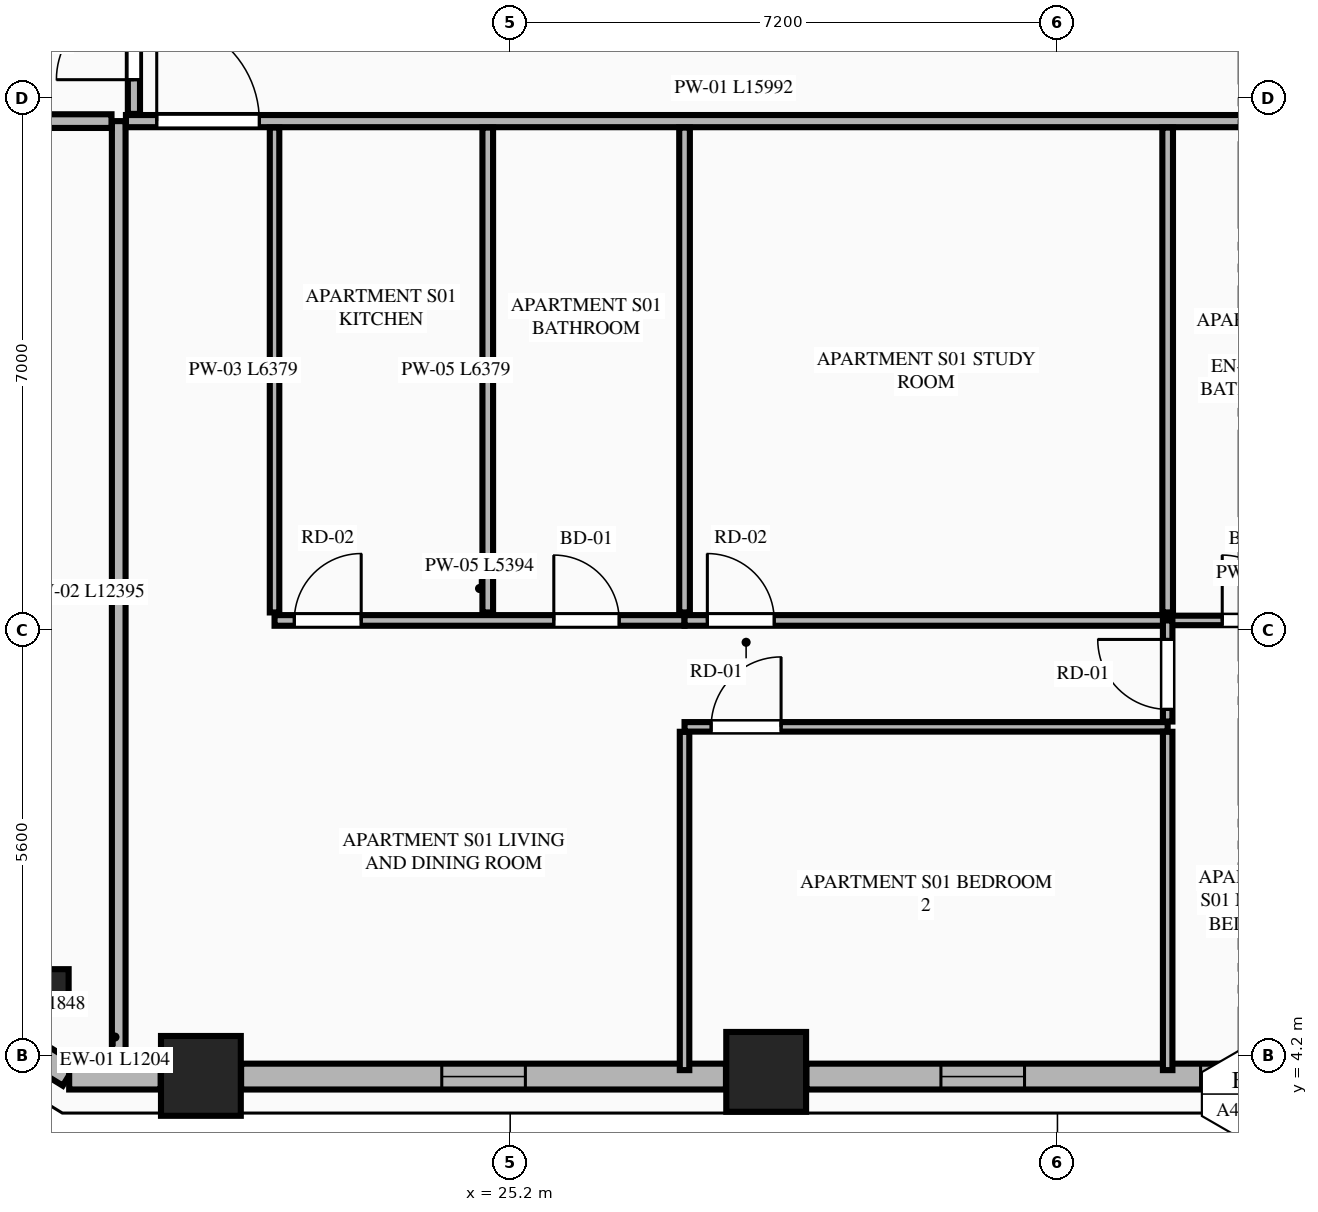
"""IFC4 building model, lengths in metres.
Left out: names, types, materials, properties, quantities, classifications, styles, units other than length and angle.
Written with IfcOpenShell. Run it as: python <this file> out.ifc"""

import sys

from ifc_helpers import new_model, si_unit, direction, frame, frame_2d, origin, origin_2d, place, context, subcontext, project, spatial, rectangle, extrude, element, fill, save


model = new_model("IFC4")
c1 = context("Model", 3, precision=1e-05, world=origin(), true_north=direction((0.0, 1.0)))
c2 = subcontext(c1, "Body", "Model", "MODEL_VIEW")
j1 = project(units=[si_unit("LENGTHUNIT", "METRE"), si_unit("PLANEANGLEUNIT", "RADIAN")], contexts=[c1])
p1 = place(None, origin())
s1 = spatial("IfcSite", under=j1, at=p1, CompositionType="ELEMENT")
p2 = place(p1, origin())
s2 = spatial("IfcBuilding", under=s1, at=p2, CompositionType="ELEMENT")
p3 = place(p2, frame((0.0, 0.0, 101.95)))
s3 = spatial("IfcBuildingStorey", under=s2, at=p3, CompositionType="ELEMENT", Elevation=101.95)
for number, where, z_axis, x_axis in (
    (1, (21.131, 3.939, 0.0), (0.0, 0.0, 1.0), (1.0, 0.0, 0.0)),
    (2, (28.568, 3.992, 0.0), (0.0, 0.0, 1.0), (1.0, 0.0, 0.0)),
):
    element("IfcColumn", number, at=place(p3, frame(where, z_axis=z_axis, x_axis=x_axis)), inside=s3, PredefinedType="COLUMN", context=c2, shape_type="SweptSolid", body=[
        extrude(rectangle(XDim=1.05, YDim=1.05, at=origin_2d()), origin(), (0.0, 0.0, 1.0), 3.55),
    ])
p4 = place(p3, frame((19.141, 5.093, 0.0), z_axis=(0.0, 0.0, 1.0), x_axis=(0.865160173452, -0.501495637342, 0.0)))
e3 = element("IfcColumn", 3, at=p4, inside=s3, PredefinedType="PILASTER", context=c2, shape_type="SweptSolid", body=[
    extrude(rectangle(XDim=0.5, YDim=0.35, at=origin_2d()), origin(), (0.0, 0.0, 1.0), 3.55),
])
p5 = place(p3, frame((17.829, 4.923, 0.0), z_axis=(0.0, 0.0, 1.0), x_axis=(0.851798915137, -0.523868884523, 0.0)))
e4 = element("IfcWall", 4, at=p5, inside=s3, PredefinedType="STANDARD", context=c2, shape_type="SweptSolid", body=[
    extrude(rectangle(XDim=1.848, YDim=0.34, at=frame_2d((0.924, 0.0))), origin(), (0.0, 0.0, 1.0), 3.34),
])
p6 = place(p3, frame((19.398, 3.93, 0.0), z_axis=(0.0, 0.0, 1.0), x_axis=(1.0, 0.0, 0.0)))
e5 = element("IfcWall", 5, at=p6, inside=s3, PredefinedType="STANDARD", context=c2, shape_type="SweptSolid", body=[
    extrude(rectangle(XDim=1.204, YDim=0.34, at=frame_2d((0.602, 0.0))), origin(), (0.0, 0.0, 1.0), 3.34),
])
p7 = place(p3, frame((21.66, 3.93, 0.0), z_axis=(0.0, 0.0, 1.0), x_axis=(1.0, 0.0, 0.0)))
e6 = element("IfcWall", 6, at=p7, inside=s3, PredefinedType="STANDARD", context=c2, shape_type="SweptSolid", body=[
    extrude(rectangle(XDim=6.379, YDim=0.34, at=frame_2d((3.189, 0.0))), origin(), (0.0, 0.0, 1.0), 2.797),
])
p8 = place(p7, frame((2.64, 0.0, 0.75)))
e7 = element("IfcOpeningElement", 7, at=p8, cuts=e6, PredefinedType="OPENING", context=c2, shape_type="SweptSolid", body=[
    extrude(rectangle(XDim=1.1, YDim=1.897, at=frame_2d((0.55, 0.948))), frame((0.0, 0.18, 0.0), z_axis=(0.0, -1.0, 0.0), x_axis=(1.0, 0.0, 0.0)), (0.0, 0.0, 1.0), 0.36),
])
p9 = place(p3, frame((29.097, 3.93, 0.0), z_axis=(0.0, 0.0, 1.0), x_axis=(1.0, 0.0, 0.0)))
e8 = element("IfcWall", 8, at=p9, inside=s3, PredefinedType="STANDARD", context=c2, shape_type="SweptSolid", body=[
    extrude(rectangle(XDim=6.606, YDim=0.34, at=frame_2d((3.303, 0.0))), origin(), (0.0, 0.0, 1.0), 2.797),
])
p10 = place(p9, frame((1.77, 0.0, 0.75)))
e9 = element("IfcOpeningElement", 9, at=p10, cuts=e8, PredefinedType="OPENING", context=c2, shape_type="SweptSolid", body=[
    extrude(rectangle(XDim=1.1, YDim=1.897, at=frame_2d((0.55, 0.948))), frame((0.0, 0.18, 0.0), z_axis=(0.0, -1.0, 0.0), x_axis=(1.0, 0.0, 0.0)), (0.0, 0.0, 1.0), 0.36),
])
p11 = place(p9, frame((5.186, 0.0, 0.75)))
e10 = element("IfcOpeningElement", 10, at=p11, cuts=e8, PredefinedType="OPENING", context=c2, shape_type="SweptSolid", body=[
    extrude(rectangle(XDim=1.1, YDim=1.897, at=frame_2d((0.55, 0.948))), frame((0.0, 0.18, 0.0), z_axis=(0.0, -1.0, 0.0), x_axis=(1.0, 0.0, 0.0)), (0.0, 0.0, 1.0), 0.36),
])
p12 = place(p3, frame((20.05, 4.105, 0.0), z_axis=(0.0, 0.0, 1.0), x_axis=(0.0, 1.0, 0.0)))
e11 = element("IfcWall", 11, at=p12, inside=s3, PredefinedType="PARTITIONING", context=c2, shape_type="SweptSolid", body=[
    extrude(rectangle(XDim=12.395, YDim=0.18, at=frame_2d((6.198, 0.0))), origin(), (0.0, 0.0, 1.0), 3.34),
])
p13 = place(p3, frame((20.145, 16.5, 0.0), z_axis=(0.0, 0.0, 1.0), x_axis=(1.0, 0.0, 0.0)))
e12 = element("IfcWall", 12, at=p13, inside=s3, PredefinedType="PARTITIONING", context=c2, shape_type="SweptSolid", body=[
    extrude(rectangle(XDim=15.992, YDim=0.16, at=frame_2d((7.996, 0.0))), origin(), (0.0, 0.0, 1.0), 3.34),
])
p14 = place(p13, frame((0.405, 0.0, 0.0)))
e13 = element("IfcOpeningElement", 13, at=p14, cuts=e12, PredefinedType="OPENING", context=c2, shape_type="SweptSolid", body=[
    extrude(rectangle(XDim=1.35, YDim=2.35, at=frame_2d((0.675, 1.175))), frame((0.0, 0.09, 0.0), z_axis=(0.0, -1.0, 0.0), x_axis=(1.0, 0.0, 0.0)), (0.0, 0.0, 1.0), 0.18),
])
p15 = place(p3, frame((22.1, 10.036, 0.0), z_axis=(0.0, 0.0, 1.0), x_axis=(0.0, 1.0, 0.0)))
e14 = element("IfcWall", 14, at=p15, inside=s3, PredefinedType="PARTITIONING", context=c2, shape_type="SweptSolid", body=[
    extrude(rectangle(XDim=6.379, YDim=0.125, at=frame_2d((3.189, 0.0))), origin(), (0.0, 0.0, 1.0), 2.722),
])
p16 = place(p3, frame((22.1, 9.931, 0.0), z_axis=(0.0, 0.0, 1.0), x_axis=(1.0, 0.0, 0.0)))
e15 = element("IfcWall", 15, at=p16, inside=s3, PredefinedType="PLUMBINGWALL", context=c2, shape_type="SweptSolid", body=[
    extrude(rectangle(XDim=5.394, YDim=0.14, at=frame_2d((2.697, 0.0))), origin(), (0.0, 0.0, 1.0), 3.34),
])
p17 = place(p16, frame((3.674, 0.0, 0.0)))
e16 = element("IfcOpeningElement", 16, at=p17, cuts=e15, PredefinedType="OPENING", context=c2, shape_type="SweptSolid", body=[
    extrude(rectangle(XDim=0.86, YDim=2.1, at=frame_2d((0.43, 1.05))), frame((0.0, 0.08, 0.0), z_axis=(0.0, -1.0, 0.0), x_axis=(1.0, 0.0, 0.0)), (0.0, 0.0, 1.0), 0.16),
])
p18 = place(p16, frame((0.26, 0.0, 0.0)))
e17 = element("IfcOpeningElement", 17, at=p18, cuts=e15, PredefinedType="OPENING", context=c2, shape_type="SweptSolid", body=[
    extrude(rectangle(XDim=0.88, YDim=2.15, at=frame_2d((0.44, 1.075))), frame((0.0, 0.08, 0.0), z_axis=(0.0, -1.0, 0.0), x_axis=(1.0, 0.0, 0.0)), (0.0, 0.0, 1.0), 0.16),
])
p19 = place(p3, frame((27.494, 9.931, 0.0), z_axis=(0.0, 0.0, 1.0), x_axis=(1.0, 0.0, 0.0)))
e18 = element("IfcWall", 18, at=p19, inside=s3, PredefinedType="PLUMBINGWALL", context=c2, shape_type="SweptSolid", body=[
    extrude(rectangle(XDim=6.356, YDim=0.14, at=frame_2d((3.178, 0.0))), origin(), (0.0, 0.0, 1.0), 3.34),
])
p20 = place(p19, frame((0.3, 0.0, 0.0)))
e19 = element("IfcOpeningElement", 19, at=p20, cuts=e18, PredefinedType="OPENING", context=c2, shape_type="SweptSolid", body=[
    extrude(rectangle(XDim=0.88, YDim=2.15, at=frame_2d((0.44, 1.075))), frame((0.0, 0.08, 0.0), z_axis=(0.0, -1.0, 0.0), x_axis=(1.0, 0.0, 0.0)), (0.0, 0.0, 1.0), 0.16),
])
p21 = place(p3, frame((33.85, 9.931, 0.0), z_axis=(0.0, 0.0, 1.0), x_axis=(1.0, 0.0, 0.0)))
e20 = element("IfcWall", 20, at=p21, inside=s3, PredefinedType="PARTITIONING", context=c2, shape_type="SweptSolid", body=[
    extrude(rectangle(XDim=2.287, YDim=0.125, at=frame_2d((1.144, 0.0))), origin(), (0.0, 0.0, 1.0), 3.34),
])
p22 = place(p21, frame((0.718, 0.0, 0.0)))
e21 = element("IfcOpeningElement", 21, at=p22, cuts=e20, PredefinedType="OPENING", context=c2, shape_type="SweptSolid", body=[
    extrude(rectangle(XDim=0.86, YDim=2.1, at=frame_2d((0.43, 1.05))), frame((0.0, 0.073, 0.0), z_axis=(0.0, -1.0, 0.0), x_axis=(1.0, 0.0, 0.0)), (0.0, 0.0, 1.0), 0.145),
])
p23 = place(p3, frame((24.905, 10.036, 0.0), z_axis=(0.0, 0.0, 1.0), x_axis=(0.0, 1.0, 0.0)))
e22 = element("IfcWall", 22, at=p23, inside=s3, PredefinedType="PLUMBINGWALL", context=c2, shape_type="SweptSolid", body=[
    extrude(rectangle(XDim=6.379, YDim=0.14, at=frame_2d((3.189, 0.0))), origin(), (0.0, 0.0, 1.0), 3.34),
])
p24 = place(p3, frame((27.494, 4.015, 0.0), z_axis=(0.0, 0.0, 1.0), x_axis=(0.0, 1.0, 0.0)))
e23 = element("IfcWall", 23, at=p24, inside=s3, PredefinedType="PARTITIONING", context=c2, shape_type="SweptSolid", body=[
    extrude(rectangle(XDim=4.451, YDim=0.125, at=frame_2d((2.226, 0.0))), origin(), (0.0, 0.0, 1.0), 3.34),
])
p25 = place(p3, frame((27.494, 8.531, 0.0), z_axis=(0.0, 0.0, 1.0), x_axis=(1.0, 0.0, 0.0)))
e24 = element("IfcWall", 24, at=p25, inside=s3, PredefinedType="PARTITIONING", context=c2, shape_type="SweptSolid", body=[
    extrude(rectangle(XDim=6.356, YDim=0.125, at=frame_2d((3.178, 0.0))), origin(), (0.0, 0.0, 1.0), 3.34),
])
p26 = place(p25, frame((0.35, 0.0, 0.0)))
e25 = element("IfcOpeningElement", 25, at=p26, cuts=e24, PredefinedType="OPENING", context=c2, shape_type="SweptSolid", body=[
    extrude(rectangle(XDim=0.92, YDim=2.15, at=frame_2d((0.46, 1.075))), frame((0.0, 0.073, 0.0), z_axis=(0.0, -1.0, 0.0), x_axis=(1.0, 0.0, 0.0)), (0.0, 0.0, 1.0), 0.145),
])
p27 = place(p3, frame((33.85, 8.601, 0.0), z_axis=(0.0, 0.0, 1.0), x_axis=(0.0, 1.0, 0.0)))
e26 = element("IfcWall", 26, at=p27, inside=s3, PredefinedType="PARTITIONING", context=c2, shape_type="SweptSolid", body=[
    extrude(rectangle(XDim=1.33, YDim=0.125, at=frame_2d((0.665, 0.0))), origin(), (0.0, 0.0, 1.0), 3.34),
])
p28 = place(p27, frame((0.16, 0.0, 0.0)))
e27 = element("IfcOpeningElement", 27, at=p28, cuts=e26, PredefinedType="OPENING", context=c2, shape_type="SweptSolid", body=[
    extrude(rectangle(XDim=0.92, YDim=2.15, at=frame_2d((0.46, 1.075))), frame((0.0, 0.073, 0.0), z_axis=(0.0, -1.0, 0.0), x_axis=(1.0, 0.0, 0.0)), (0.0, 0.0, 1.0), 0.145),
])
for number, where, z_axis, x_axis in (
    (28, (27.494, 10.036, 0.0), (0.0, 0.0, 1.0), (0.0, 1.0, 0.0)),
    (29, (33.85, 10.036, 0.0), (0.0, 0.0, 1.0), (0.0, 1.0, 0.0)),
):
    element("IfcWall", number, at=place(p3, frame(where, z_axis=z_axis, x_axis=x_axis)), inside=s3, PredefinedType="PLUMBINGWALL", context=c2, shape_type="SweptSolid", body=[
        extrude(rectangle(XDim=6.379, YDim=0.14, at=frame_2d((3.189, 0.0))), origin(), (0.0, 0.0, 1.0), 3.34),
    ])
p29 = place(p3, frame((33.85, 4.015, 0.0), z_axis=(0.0, 0.0, 1.0), x_axis=(0.0, 1.0, 0.0)))
e30 = element("IfcWall", 30, at=p29, inside=s3, PredefinedType="PARTITIONING", context=c2, shape_type="SweptSolid", body=[
    extrude(rectangle(XDim=4.451, YDim=0.125, at=frame_2d((2.226, 0.0))), origin(), (0.0, 0.0, 1.0), 3.34),
])
p30 = place(p3, frame((12.185, 16.5, 0.0), z_axis=(0.0, 0.0, 1.0), x_axis=(1.0, 0.0, 0.0)))
e31 = element("IfcWall", 31, at=p30, inside=s3, PredefinedType="PARTITIONING", context=c2, shape_type="SweptSolid", body=[
    extrude(rectangle(XDim=7.77, YDim=0.18, at=frame_2d((3.885, 0.0))), origin(), (0.0, 0.0, 1.0), 3.34),
])
p31 = place(p3, frame((20.25, 16.595, 0.0), z_axis=(0.0, 0.0, 1.0), x_axis=(0.0, 1.0, 0.0)))
e32 = element("IfcWall", 32, at=p31, inside=s3, PredefinedType="PARTITIONING", context=c2, shape_type="SweptSolid", body=[
    extrude(rectangle(XDim=18.61, YDim=0.16, at=frame_2d((9.305, 0.0))), origin(), (0.0, 0.0, 1.0), 3.34),
])
p32 = place(p31, frame((0.45, 0.0, 0.0)))
e33 = element("IfcOpeningElement", 33, at=p32, cuts=e32, PredefinedType="OPENING", context=c2, shape_type="SweptSolid", body=[
    extrude(rectangle(XDim=1.02, YDim=2.25, at=frame_2d((0.51, 1.125))), frame((0.0, 0.09, 0.0), z_axis=(0.0, -1.0, 0.0), x_axis=(1.0, 0.0, 0.0)), (0.0, 0.0, 1.0), 0.18),
])
p33 = place(p8, origin())
e34 = element("IfcWindow", 34, at=p33, inside=s3, PartitioningType="SINGLE_PANEL", PredefinedType="WINDOW", context=c2, shape_type="SweptSolid", body=[
    extrude(rectangle(XDim=1.1, YDim=1.897, at=frame_2d((0.55, 0.948))), frame((0.0, 0.03, 0.0), z_axis=(0.0, -1.0, 0.0), x_axis=(1.0, 0.0, 0.0)), (0.0, 0.0, 1.0), 0.06),
])
fill(e7, e34)
p34 = place(p10, origin())
e35 = element("IfcWindow", 35, at=p34, inside=s3, PartitioningType="SINGLE_PANEL", PredefinedType="WINDOW", context=c2, shape_type="SweptSolid", body=[
    extrude(rectangle(XDim=1.1, YDim=1.897, at=frame_2d((0.55, 0.948))), frame((0.0, 0.03, 0.0), z_axis=(0.0, -1.0, 0.0), x_axis=(1.0, 0.0, 0.0)), (0.0, 0.0, 1.0), 0.06),
])
fill(e9, e35)
p35 = place(p17, origin())
e36 = element("IfcDoor", 36, at=p35, inside=s3, OperationType="SINGLE_SWING_LEFT", PredefinedType="DOOR", context=c2, shape_type="SweptSolid", body=[
    extrude(rectangle(XDim=0.86, YDim=2.1, at=frame_2d((0.43, 1.05))), frame((0.0, 0.025, 0.0), z_axis=(0.0, -1.0, 0.0), x_axis=(1.0, 0.0, 0.0)), (0.0, 0.0, 1.0), 0.05),
])
fill(e16, e36)
p36 = place(p22, origin())
e37 = element("IfcDoor", 37, at=p36, inside=s3, OperationType="SINGLE_SWING_LEFT", PredefinedType="DOOR", context=c2, shape_type="SweptSolid", body=[
    extrude(rectangle(XDim=0.86, YDim=2.1, at=frame_2d((0.43, 1.05))), frame((0.0, 0.025, 0.0), z_axis=(0.0, -1.0, 0.0), x_axis=(1.0, 0.0, 0.0)), (0.0, 0.0, 1.0), 0.05),
])
fill(e21, e37)
p37 = place(p14, origin())
e38 = element("IfcDoor", 38, at=p37, inside=s3, OperationType="SINGLE_SWING_LEFT", PredefinedType="DOOR", context=c2, shape_type="SweptSolid", body=[
    extrude(rectangle(XDim=1.35, YDim=2.35, at=frame_2d((0.675, 1.175))), frame((0.0, 0.025, 0.0), z_axis=(0.0, -1.0, 0.0), x_axis=(1.0, 0.0, 0.0)), (0.0, 0.0, 1.0), 0.05),
])
fill(e13, e38)
p38 = place(p18, origin())
e39 = element("IfcDoor", 39, at=p38, inside=s3, OperationType="SINGLE_SWING_RIGHT", PredefinedType="DOOR", context=c2, shape_type="SweptSolid", body=[
    extrude(rectangle(XDim=0.88, YDim=2.15, at=frame_2d((0.44, 1.075))), frame((0.0, 0.025, 0.0), z_axis=(0.0, -1.0, 0.0), x_axis=(1.0, 0.0, 0.0)), (0.0, 0.0, 1.0), 0.05),
])
fill(e17, e39)
p39 = place(p20, origin())
e40 = element("IfcDoor", 40, at=p39, inside=s3, OperationType="SINGLE_SWING_LEFT", PredefinedType="DOOR", context=c2, shape_type="SweptSolid", body=[
    extrude(rectangle(XDim=0.88, YDim=2.15, at=frame_2d((0.44, 1.075))), frame((0.0, 0.025, 0.0), z_axis=(0.0, -1.0, 0.0), x_axis=(1.0, 0.0, 0.0)), (0.0, 0.0, 1.0), 0.05),
])
fill(e19, e40)
p40 = place(p26, origin())
e41 = element("IfcDoor", 41, at=p40, inside=s3, OperationType="SINGLE_SWING_RIGHT", PredefinedType="DOOR", context=c2, shape_type="SweptSolid", body=[
    extrude(rectangle(XDim=0.92, YDim=2.15, at=frame_2d((0.46, 1.075))), frame((0.0, 0.025, 0.0), z_axis=(0.0, -1.0, 0.0), x_axis=(1.0, 0.0, 0.0)), (0.0, 0.0, 1.0), 0.05),
])
fill(e25, e41)
p41 = place(p28, origin())
e42 = element("IfcDoor", 42, at=p41, inside=s3, OperationType="SINGLE_SWING_RIGHT", PredefinedType="DOOR", context=c2, shape_type="SweptSolid", body=[
    extrude(rectangle(XDim=0.92, YDim=2.15, at=frame_2d((0.46, 1.075))), frame((0.0, 0.025, 0.0), z_axis=(0.0, -1.0, 0.0), x_axis=(1.0, 0.0, 0.0)), (0.0, 0.0, 1.0), 0.05),
])
fill(e27, e42)
p42 = place(p32, origin())
e43 = element("IfcDoor", 43, at=p42, inside=s3, OperationType="SINGLE_SWING_LEFT", PredefinedType="DOOR", context=c2, shape_type="SweptSolid", body=[
    extrude(rectangle(XDim=1.02, YDim=2.25, at=frame_2d((0.51, 1.125))), frame((0.0, 0.025, 0.0), z_axis=(0.0, -1.0, 0.0), x_axis=(1.0, 0.0, 0.0)), (0.0, 0.0, 1.0), 0.05),
])
fill(e33, e43)
p43 = place(p11, origin())
e44 = element("IfcWindow", 44, at=p43, inside=s3, PartitioningType="SINGLE_PANEL", PredefinedType="WINDOW", context=c2, shape_type="SweptSolid", body=[
    extrude(rectangle(XDim=1.1, YDim=1.897, at=frame_2d((0.55, 0.948))), frame((0.0, 0.03, 0.0), z_axis=(0.0, -1.0, 0.0), x_axis=(1.0, 0.0, 0.0)), (0.0, 0.0, 1.0), 0.06),
])
fill(e10, e44)
save(model, sys.argv[1])
